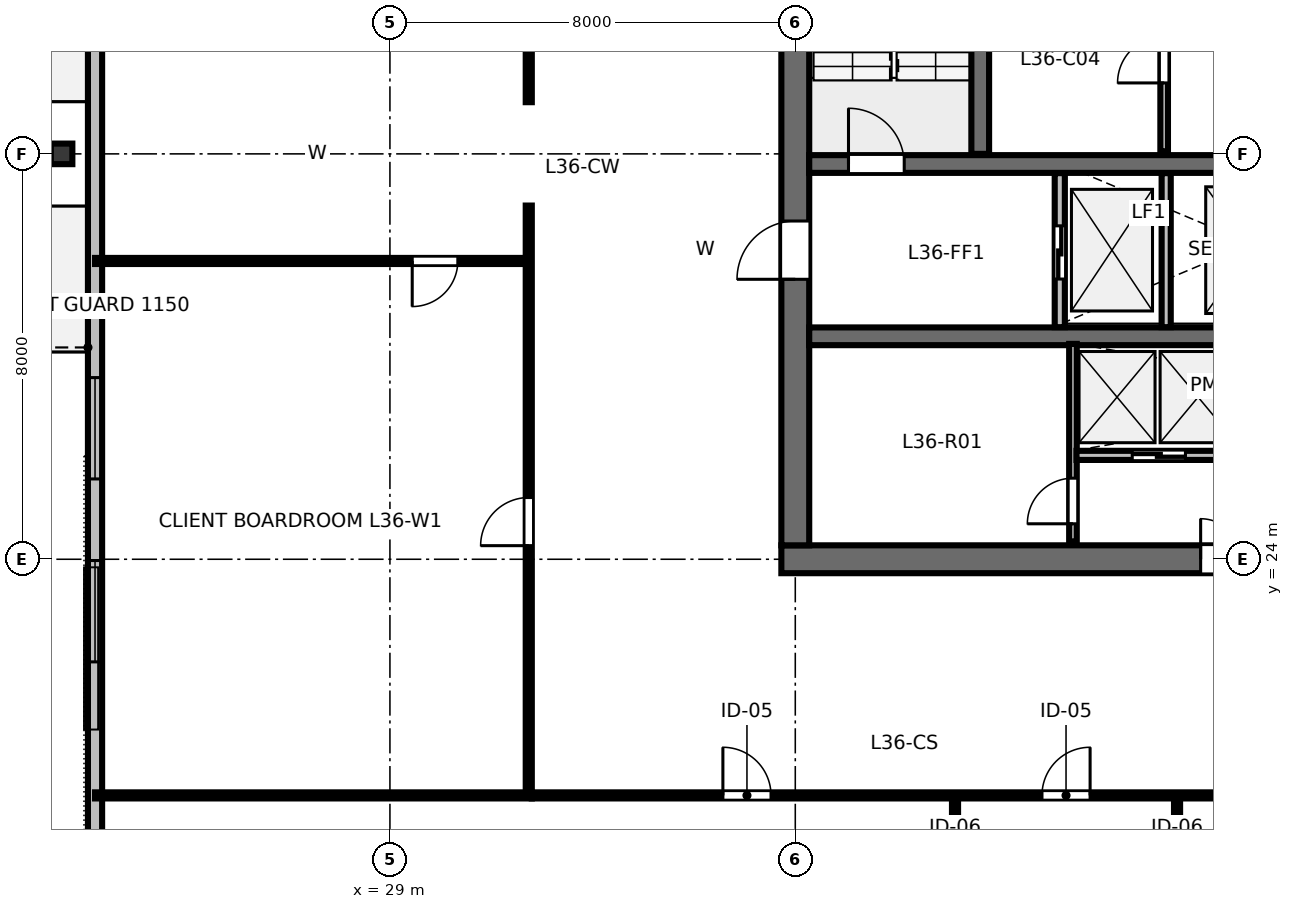
"""IFC4 building model, lengths in metres.
Left out: names, types, materials, properties, quantities, classifications, styles, units other than length and angle.
Written with IfcOpenShell. Run it as: python <this file> out.ifc"""

import sys

from ifc_helpers import new_model, si_unit, direction, frame, frame_2d, origin, origin_2d, place, context, subcontext, project, spatial, rectangle, i_section, extrude, element, fill, save


model = new_model("IFC4")
c1 = context("Model", 3, precision=1e-05, world=origin(), true_north=direction((0.0, 1.0)))
c2 = subcontext(c1, "Body", "Model", "MODEL_VIEW")
j1 = project(units=[si_unit("LENGTHUNIT", "METRE"), si_unit("PLANEANGLEUNIT", "RADIAN")], contexts=[c1])
p1 = place(None, origin())
s1 = spatial("IfcSite", under=j1, at=p1, CompositionType="ELEMENT")
p2 = place(p1, origin())
s2 = spatial("IfcBuilding", under=s1, at=p2, CompositionType="ELEMENT")
p3 = place(p2, frame((0.0, 0.0, 138.4)))
s3 = spatial("IfcBuildingStorey", under=s2, at=p3, CompositionType="ELEMENT", Elevation=138.4)
p4 = place(p3, frame((36.725, 24.0, 0.0), z_axis=(0.0, 0.0, 1.0), x_axis=(1.0, 0.0, 0.0)))
e1 = element("IfcWall", 1, at=p4, inside=s3, PredefinedType="SHEAR", context=c2, shape_type="SweptSolid", body=[
    extrude(rectangle(XDim=18.55, YDim=0.55, at=frame_2d((9.275, 0.0))), origin(), (0.0, 0.0, 1.0), 3.36),
])
p5 = place(p4, frame((8.275, 0.0, 0.0)))
e2 = element("IfcOpeningElement", 2, at=p5, cuts=e1, PredefinedType="OPENING", context=c2, shape_type="SweptSolid", body=[
    extrude(rectangle(XDim=1.6, YDim=2.15, at=frame_2d((0.8, 1.075))), frame((0.0, 0.285, 0.0), z_axis=(0.0, -1.0, 0.0), x_axis=(1.0, 0.0, 0.0)), (0.0, 0.0, 1.0), 0.57),
])
p6 = place(p4, frame((13.675, 0.0, 0.0)))
e3 = element("IfcOpeningElement", 3, at=p6, cuts=e1, PredefinedType="OPENING", context=c2, shape_type="SweptSolid", body=[
    extrude(rectangle(XDim=1.6, YDim=2.15, at=frame_2d((0.8, 1.075))), frame((0.0, 0.285, 0.0), z_axis=(0.0, -1.0, 0.0), x_axis=(1.0, 0.0, 0.0)), (0.0, 0.0, 1.0), 0.57),
])
p7 = place(p3, frame((37.0, 24.275, 0.0), z_axis=(0.0, 0.0, 1.0), x_axis=(0.0, 1.0, 0.0)))
e4 = element("IfcWall", 4, at=p7, inside=s3, PredefinedType="SHEAR", context=c2, shape_type="SweptSolid", body=[
    extrude(rectangle(XDim=15.45, YDim=0.55, at=frame_2d((7.725, 0.0))), origin(), (0.0, 0.0, 1.0), 3.36),
])
p8 = place(p7, frame((5.25, 0.0, 0.0)))
e5 = element("IfcOpeningElement", 5, at=p8, cuts=e4, PredefinedType="OPENING", context=c2, shape_type="SweptSolid", body=[
    extrude(rectangle(XDim=1.15, YDim=2.15, at=frame_2d((0.575, 1.075))), frame((0.0, 0.285, 0.0), z_axis=(0.0, -1.0, 0.0), x_axis=(1.0, 0.0, 0.0)), (0.0, 0.0, 1.0), 0.57),
])
p9 = place(p3, frame((37.275, 31.8, 0.0), z_axis=(0.0, 0.0, 1.0), x_axis=(1.0, 0.0, 0.0)))
e6 = element("IfcWall", 6, at=p9, inside=s3, PredefinedType="SHEAR", context=c2, shape_type="SweptSolid", body=[
    extrude(rectangle(XDim=17.45, YDim=0.35, at=frame_2d((8.725, 0.0))), origin(), (0.0, 0.0, 1.0), 3.36),
])
p10 = place(p9, frame((0.775, 0.0, 0.0)))
e7 = element("IfcOpeningElement", 7, at=p10, cuts=e6, PredefinedType="OPENING", context=c2, shape_type="SweptSolid", body=[
    extrude(rectangle(XDim=1.1, YDim=2.15, at=frame_2d((0.55, 1.075))), frame((0.0, 0.185, 0.0), z_axis=(0.0, -1.0, 0.0), x_axis=(1.0, 0.0, 0.0)), (0.0, 0.0, 1.0), 0.37),
])
p11 = place(p9, frame((14.675, 0.0, 0.0)))
e8 = element("IfcOpeningElement", 8, at=p11, cuts=e6, PredefinedType="OPENING", context=c2, shape_type="SweptSolid", body=[
    extrude(rectangle(XDim=1.1, YDim=2.15, at=frame_2d((0.55, 1.075))), frame((0.0, 0.185, 0.0), z_axis=(0.0, -1.0, 0.0), x_axis=(1.0, 0.0, 0.0)), (0.0, 0.0, 1.0), 0.37),
])
p12 = place(p3, frame((37.275, 28.4, 0.0), z_axis=(0.0, 0.0, 1.0), x_axis=(1.0, 0.0, 0.0)))
e9 = element("IfcWall", 9, at=p12, inside=s3, PredefinedType="SHEAR", context=c2, shape_type="SweptSolid", body=[
    extrude(rectangle(XDim=17.45, YDim=0.35, at=frame_2d((8.725, 0.0))), origin(), (0.0, 0.0, 1.0), 3.36),
])
p13 = place(p3, frame((22.52, 32.0, 0.0), z_axis=(0.0, 0.0, 1.0), x_axis=(0.0, 1.0, 0.0)))
e10 = element("IfcColumn", 10, at=p13, inside=s3, PredefinedType="COLUMN", context=c2, shape_type="SweptSolid", body=[
    extrude(i_section(OverallWidth=0.406, OverallDepth=0.425, WebThickness=0.033, FlangeThickness=0.052, FilletRadius=0.025, at=origin_2d()), origin(), (0.0, 0.0, 1.0), 3.358),
])
p14 = place(p3, frame((23.18, 47.54, 0.0), z_axis=(0.0, 0.0, 1.0), x_axis=(0.0, -1.0, 0.0)))
e11 = element("IfcWall", 11, at=p14, inside=s3, PredefinedType="STANDARD", context=c2, shape_type="SweptSolid", body=[
    extrude(rectangle(XDim=31.08, YDim=0.28, at=frame_2d((15.54, 0.0))), origin(), (0.0, 0.0, 1.0), 3.36),
])
p15 = place(p14, frame((11.86, 0.0, 0.0)))
e12 = element("IfcOpeningElement", 12, at=p15, cuts=e11, PredefinedType="OPENING", context=c2, shape_type="SweptSolid", body=[
    extrude(rectangle(XDim=1.4, YDim=2.15, at=frame_2d((0.7, 1.075))), frame((0.0, 0.15, 0.0), z_axis=(0.0, -1.0, 0.0), x_axis=(1.0, 0.0, 0.0)), (0.0, 0.0, 1.0), 0.3),
])
p16 = place(p14, frame((5.515, 0.0, 0.8)))
e13 = element("IfcOpeningElement", 13, at=p16, cuts=e11, PredefinedType="OPENING", context=c2, shape_type="SweptSolid", body=[
    extrude(rectangle(XDim=2.0, YDim=1.95, at=frame_2d((1.0, 0.975))), frame((0.0, 0.15, 0.0), z_axis=(0.0, -1.0, 0.0), x_axis=(1.0, 0.0, 0.0)), (0.0, 0.0, 1.0), 0.3),
])
p17 = place(p14, frame((9.125, 0.0, 0.8)))
e14 = element("IfcOpeningElement", 14, at=p17, cuts=e11, PredefinedType="OPENING", context=c2, shape_type="SweptSolid", body=[
    extrude(rectangle(XDim=2.0, YDim=1.95, at=frame_2d((1.0, 0.975))), frame((0.0, 0.15, 0.0), z_axis=(0.0, -1.0, 0.0), x_axis=(1.0, 0.0, 0.0)), (0.0, 0.0, 1.0), 0.3),
])
p18 = place(p14, frame((19.955, 0.0, 0.8)))
e15 = element("IfcOpeningElement", 15, at=p18, cuts=e11, PredefinedType="OPENING", context=c2, shape_type="SweptSolid", body=[
    extrude(rectangle(XDim=2.0, YDim=1.95, at=frame_2d((1.0, 0.975))), frame((0.0, 0.15, 0.0), z_axis=(0.0, -1.0, 0.0), x_axis=(1.0, 0.0, 0.0)), (0.0, 0.0, 1.0), 0.3),
])
p19 = place(p14, frame((23.565, 0.0, 0.8)))
e16 = element("IfcOpeningElement", 16, at=p19, cuts=e11, PredefinedType="OPENING", context=c2, shape_type="SweptSolid", body=[
    extrude(rectangle(XDim=2.0, YDim=1.95, at=frame_2d((1.0, 0.975))), frame((0.0, 0.15, 0.0), z_axis=(0.0, -1.0, 0.0), x_axis=(1.0, 0.0, 0.0)), (0.0, 0.0, 1.0), 0.3),
])
p20 = place(p3, frame((40.65, 32.0, 0.0), z_axis=(0.0, 0.0, 1.0), x_axis=(0.0, 1.0, 0.0)))
e17 = element("IfcWall", 17, at=p20, inside=s3, PredefinedType="SHEAR", context=c2, shape_type="SweptSolid", body=[
    extrude(rectangle(XDim=7.7, YDim=0.35, at=frame_2d((3.85, 0.0))), origin(), (0.0, 0.0, 1.0), 3.6),
])
p21 = place(p3, frame((44.28, 32.05, 0.0), z_axis=(0.0, 0.0, 1.0), x_axis=(0.0, 1.0, 0.0)))
e18 = element("IfcWall", 18, at=p21, inside=s3, PredefinedType="PARTITIONING", context=c2, shape_type="SweptSolid", body=[
    extrude(rectangle(XDim=3.67, YDim=0.15, at=frame_2d((1.835, 0.0))), origin(), (0.0, 0.0, 1.0), 3.36),
])
p22 = place(p21, frame((1.35, 0.0, 0.0)))
e19 = element("IfcOpeningElement", 19, at=p22, cuts=e18, PredefinedType="OPENING", context=c2, shape_type="SweptSolid", body=[
    extrude(rectangle(XDim=0.92, YDim=2.15, at=frame_2d((0.46, 1.075))), frame((0.0, 0.085, 0.0), z_axis=(0.0, -1.0, 0.0), x_axis=(1.0, 0.0, 0.0)), (0.0, 0.0, 1.0), 0.17),
])
p23 = place(p3, frame((42.22, 28.58, 0.0), z_axis=(0.0, 0.0, 1.0), x_axis=(0.0, 1.0, 0.0)))
e20 = element("IfcWall", 20, at=p23, inside=s3, PredefinedType="PARTITIONING", context=c2, shape_type="SweptSolid", body=[
    extrude(rectangle(XDim=3.04, YDim=0.2, at=frame_2d((1.52, 0.0))), origin(), (0.0, 0.0, 1.0), 3.36),
])
p24 = place(p23, frame((0.95, 0.0, 0.0)))
e21 = element("IfcOpeningElement", 21, at=p24, cuts=e20, PredefinedType="OPENING", context=c2, shape_type="SweptSolid", body=[
    extrude(rectangle(XDim=1.05, YDim=2.15, at=frame_2d((0.525, 1.075))), frame((0.0, 0.11, 0.0), z_axis=(0.0, -1.0, 0.0), x_axis=(1.0, 0.0, 0.0)), (0.0, 0.0, 1.0), 0.22),
])
p25 = place(p3, frame((44.32, 28.58, 0.0), z_axis=(0.0, 0.0, 1.0), x_axis=(0.0, 1.0, 0.0)))
e22 = element("IfcWall", 22, at=p25, inside=s3, PredefinedType="PARTITIONING", context=c2, shape_type="SweptSolid", body=[
    extrude(rectangle(XDim=3.04, YDim=0.18, at=frame_2d((1.52, 0.0))), origin(), (0.0, 0.0, 1.0), 3.36),
])
p26 = place(p3, frame((42.48, 24.35, 0.0), z_axis=(0.0, 0.0, 1.0), x_axis=(0.0, 1.0, 0.0)))
e23 = element("IfcWall", 23, at=p26, inside=s3, PredefinedType="PARTITIONING", context=c2, shape_type="SweptSolid", body=[
    extrude(rectangle(XDim=3.9, YDim=0.15, at=frame_2d((1.95, 0.0))), origin(), (0.0, 0.0, 1.0), 3.36),
])
p27 = place(p26, frame((0.35, 0.0, 0.0)))
e24 = element("IfcOpeningElement", 24, at=p27, cuts=e23, PredefinedType="OPENING", context=c2, shape_type="SweptSolid", body=[
    extrude(rectangle(XDim=0.9, YDim=2.15, at=frame_2d((0.45, 1.075))), frame((0.0, 0.085, 0.0), z_axis=(0.0, -1.0, 0.0), x_axis=(1.0, 0.0, 0.0)), (0.0, 0.0, 1.0), 0.17),
])
p28 = place(p3, frame((42.55, 26.05, 0.0), z_axis=(0.0, 0.0, 1.0), x_axis=(1.0, 0.0, 0.0)))
e25 = element("IfcWall", 25, at=p28, inside=s3, PredefinedType="PARTITIONING", context=c2, shape_type="SweptSolid", body=[
    extrude(rectangle(XDim=12.05, YDim=0.18, at=frame_2d((6.025, 0.0))), origin(), (0.0, 0.0, 1.0), 3.36),
])
p29 = place(p28, frame((1.1, 0.0, 0.0)))
e26 = element("IfcOpeningElement", 26, at=p29, cuts=e25, PredefinedType="OPENING", context=c2, shape_type="SweptSolid", body=[
    extrude(rectangle(XDim=1.05, YDim=2.15, at=frame_2d((0.525, 1.075))), frame((0.0, 0.1, 0.0), z_axis=(0.0, -1.0, 0.0), x_axis=(1.0, 0.0, 0.0)), (0.0, 0.0, 1.0), 0.2),
])
p30 = place(p28, frame((3.0, 0.0, 0.0)))
e27 = element("IfcOpeningElement", 27, at=p30, cuts=e25, PredefinedType="OPENING", context=c2, shape_type="SweptSolid", body=[
    extrude(rectangle(XDim=1.05, YDim=2.15, at=frame_2d((0.525, 1.075))), frame((0.0, 0.1, 0.0), z_axis=(0.0, -1.0, 0.0), x_axis=(1.0, 0.0, 0.0)), (0.0, 0.0, 1.0), 0.2),
])
p31 = place(p3, frame((40.152, 19.34, 0.0), z_axis=(0.0, 0.0, 1.0), x_axis=(0.0, -1.0, 0.0)))
e28 = element("IfcWall", 28, at=p31, inside=s3, PredefinedType="PARTITIONING", context=c2, shape_type="SweptSolid", body=[
    extrude(rectangle(XDim=7.46, YDim=0.12, at=frame_2d((3.73, 0.0))), origin(), (0.0, 0.0, 1.0), 2.64),
])
p32 = place(p31, frame((1.4, 0.0, 0.0)))
e29 = element("IfcOpeningElement", 29, at=p32, cuts=e28, PredefinedType="OPENING", context=c2, shape_type="SweptSolid", body=[
    extrude(rectangle(XDim=0.9, YDim=2.15, at=frame_2d((0.45, 1.075))), frame((0.0, 0.07, 0.0), z_axis=(0.0, -1.0, 0.0), x_axis=(1.0, 0.0, 0.0)), (0.0, 0.0, 1.0), 0.14),
])
p33 = place(p3, frame((44.534, 19.34, 0.0), z_axis=(0.0, 0.0, 1.0), x_axis=(0.0, -1.0, 0.0)))
e30 = element("IfcWall", 30, at=p33, inside=s3, PredefinedType="PARTITIONING", context=c2, shape_type="SweptSolid", body=[
    extrude(rectangle(XDim=7.46, YDim=0.12, at=frame_2d((3.73, 0.0))), origin(), (0.0, 0.0, 1.0), 2.64),
])
p34 = place(p33, frame((1.4, 0.0, 0.0)))
e31 = element("IfcOpeningElement", 31, at=p34, cuts=e30, PredefinedType="OPENING", context=c2, shape_type="SweptSolid", body=[
    extrude(rectangle(XDim=0.9, YDim=2.15, at=frame_2d((0.45, 1.075))), frame((0.0, 0.07, 0.0), z_axis=(0.0, -1.0, 0.0), x_axis=(1.0, 0.0, 0.0)), (0.0, 0.0, 1.0), 0.14),
])
p35 = place(p3, frame((31.8, 19.34, 0.0), z_axis=(0.0, 0.0, 1.0), x_axis=(1.0, 0.0, 0.0)))
e32 = element("IfcWall", 32, at=p35, inside=s3, PredefinedType="PARTITIONING", context=c2, shape_type="SweptSolid", body=[
    extrude(rectangle(XDim=28.4, YDim=0.12, at=frame_2d((14.2, 0.0))), origin(), (0.0, 0.0, 1.0), 2.64),
])
p36 = place(p35, frame((3.771, 0.0, 0.0)))
e33 = element("IfcOpeningElement", 33, at=p36, cuts=e32, PredefinedType="OPENING", context=c2, shape_type="SweptSolid", body=[
    extrude(rectangle(XDim=0.95, YDim=2.15, at=frame_2d((0.475, 1.075))), frame((0.0, 0.07, 0.0), z_axis=(0.0, -1.0, 0.0), x_axis=(1.0, 0.0, 0.0)), (0.0, 0.0, 1.0), 0.14),
])
p37 = place(p35, frame((10.068, 0.0, 0.0)))
e34 = element("IfcOpeningElement", 34, at=p37, cuts=e32, PredefinedType="OPENING", context=c2, shape_type="SweptSolid", body=[
    extrude(rectangle(XDim=0.95, YDim=2.15, at=frame_2d((0.475, 1.075))), frame((0.0, 0.07, 0.0), z_axis=(0.0, -1.0, 0.0), x_axis=(1.0, 0.0, 0.0)), (0.0, 0.0, 1.0), 0.14),
])
p38 = place(p35, frame((13.828, 0.0, 0.0)))
e35 = element("IfcOpeningElement", 35, at=p38, cuts=e32, PredefinedType="OPENING", context=c2, shape_type="SweptSolid", body=[
    extrude(rectangle(XDim=0.95, YDim=2.15, at=frame_2d((0.475, 1.075))), frame((0.0, 0.07, 0.0), z_axis=(0.0, -1.0, 0.0), x_axis=(1.0, 0.0, 0.0)), (0.0, 0.0, 1.0), 0.14),
])
p39 = place(p35, frame((18.648, 0.0, 0.0)))
e36 = element("IfcOpeningElement", 36, at=p39, cuts=e32, PredefinedType="OPENING", context=c2, shape_type="SweptSolid", body=[
    extrude(rectangle(XDim=0.95, YDim=2.15, at=frame_2d((0.475, 1.075))), frame((0.0, 0.07, 0.0), z_axis=(0.0, -1.0, 0.0), x_axis=(1.0, 0.0, 0.0)), (0.0, 0.0, 1.0), 0.14),
])
p40 = place(p35, frame((24.842, 0.0, 0.0)))
e37 = element("IfcOpeningElement", 37, at=p40, cuts=e32, PredefinedType="OPENING", context=c2, shape_type="SweptSolid", body=[
    extrude(rectangle(XDim=0.95, YDim=2.15, at=frame_2d((0.475, 1.075))), frame((0.0, 0.07, 0.0), z_axis=(0.0, -1.0, 0.0), x_axis=(1.0, 0.0, 0.0)), (0.0, 0.0, 1.0), 0.14),
])
p41 = place(p3, frame((31.74, 29.887, 0.0), z_axis=(0.0, 0.0, 1.0), x_axis=(-1.0, 0.0, 0.0)))
e38 = element("IfcWall", 38, at=p41, inside=s3, PredefinedType="PARTITIONING", context=c2, shape_type="SweptSolid", body=[
    extrude(rectangle(XDim=8.56, YDim=0.12, at=frame_2d((4.28, 0.0))), origin(), (0.0, 0.0, 1.0), 2.64),
])
p42 = place(p41, frame((1.4, 0.0, 0.0)))
e39 = element("IfcOpeningElement", 39, at=p42, cuts=e38, PredefinedType="OPENING", context=c2, shape_type="SweptSolid", body=[
    extrude(rectangle(XDim=0.9, YDim=2.15, at=frame_2d((0.45, 1.075))), frame((0.0, 0.07, 0.0), z_axis=(0.0, -1.0, 0.0), x_axis=(1.0, 0.0, 0.0)), (0.0, 0.0, 1.0), 0.14),
])
p43 = place(p3, frame((31.74, 19.4, 0.0), z_axis=(0.0, 0.0, 1.0), x_axis=(0.0, 1.0, 0.0)))
e40 = element("IfcWall", 40, at=p43, inside=s3, PredefinedType="PARTITIONING", context=c2, shape_type="SweptSolid", body=[
    extrude(rectangle(XDim=11.58, YDim=0.12, at=frame_2d((5.79, 0.0))), origin(), (0.0, 0.0, 1.0), 2.64),
])
p44 = place(p43, frame((4.868, 0.0, 0.0)))
e41 = element("IfcOpeningElement", 41, at=p44, cuts=e40, PredefinedType="OPENING", context=c2, shape_type="SweptSolid", body=[
    extrude(rectangle(XDim=0.95, YDim=2.15, at=frame_2d((0.475, 1.075))), frame((0.0, 0.07, 0.0), z_axis=(0.0, -1.0, 0.0), x_axis=(1.0, 0.0, 0.0)), (0.0, 0.0, 1.0), 0.14),
])
p45 = place(p3, frame((31.74, 33.02, 0.0), z_axis=(0.0, 0.0, 1.0), x_axis=(0.0, 1.0, 0.0)))
e42 = element("IfcWall", 42, at=p45, inside=s3, PredefinedType="PARTITIONING", context=c2, shape_type="SweptSolid", body=[
    extrude(rectangle(XDim=11.58, YDim=0.12, at=frame_2d((5.79, 0.0))), origin(), (0.0, 0.0, 1.0), 2.64),
])
p46 = place(p45, frame((5.215, 0.0, 0.0)))
e43 = element("IfcOpeningElement", 43, at=p46, cuts=e42, PredefinedType="OPENING", context=c2, shape_type="SweptSolid", body=[
    extrude(rectangle(XDim=0.95, YDim=2.15, at=frame_2d((0.475, 1.075))), frame((0.0, 0.07, 0.0), z_axis=(0.0, -1.0, 0.0), x_axis=(1.0, 0.0, 0.0)), (0.0, 0.0, 1.0), 0.14),
])
p47 = place(p3, frame((31.8, 19.34, 0.0), z_axis=(0.0, 0.0, 1.0), x_axis=(-1.0, 0.0, 0.0)))
e44 = element("IfcWall", 44, at=p47, inside=s3, PredefinedType="PARTITIONING", context=c2, shape_type="SweptSolid", body=[
    extrude(rectangle(XDim=8.62, YDim=0.12, at=frame_2d((4.31, 0.0))), origin(), (0.0, 0.0, 1.0), 2.64),
])
p48 = place(p18, origin())
e45 = element("IfcWindow", 45, at=p48, inside=s3, PartitioningType="SINGLE_PANEL", PredefinedType="WINDOW", context=c2, shape_type="SweptSolid", body=[
    extrude(rectangle(XDim=2.0, YDim=1.95, at=frame_2d((1.0, 0.975))), frame((0.0, 0.03, 0.0), z_axis=(0.0, -1.0, 0.0), x_axis=(1.0, 0.0, 0.0)), (0.0, 0.0, 1.0), 0.06),
])
fill(e15, e45)
p49 = place(p19, origin())
e46 = element("IfcWindow", 46, at=p49, inside=s3, PartitioningType="SINGLE_PANEL", PredefinedType="WINDOW", context=c2, shape_type="SweptSolid", body=[
    extrude(rectangle(XDim=2.0, YDim=1.95, at=frame_2d((1.0, 0.975))), frame((0.0, 0.03, 0.0), z_axis=(0.0, -1.0, 0.0), x_axis=(1.0, 0.0, 0.0)), (0.0, 0.0, 1.0), 0.06),
])
fill(e16, e46)
p50 = place(p10, origin())
e47 = element("IfcDoor", 47, at=p50, inside=s3, OperationType="SINGLE_SWING_LEFT", PredefinedType="DOOR", context=c2, shape_type="SweptSolid", body=[
    extrude(rectangle(XDim=1.1, YDim=2.15, at=frame_2d((0.55, 1.075))), frame((0.0, 0.025, 0.0), z_axis=(0.0, -1.0, 0.0), x_axis=(1.0, 0.0, 0.0)), (0.0, 0.0, 1.0), 0.05),
])
fill(e7, e47)
p51 = place(p8, origin())
e48 = element("IfcDoor", 48, at=p51, inside=s3, OperationType="SINGLE_SWING_LEFT", PredefinedType="DOOR", context=c2, shape_type="SweptSolid", body=[
    extrude(rectangle(XDim=1.15, YDim=2.15, at=frame_2d((0.575, 1.075))), frame((0.0, 0.025, 0.0), z_axis=(0.0, -1.0, 0.0), x_axis=(1.0, 0.0, 0.0)), (0.0, 0.0, 1.0), 0.05),
])
fill(e5, e48)
p52 = place(p5, origin())
e49 = element("IfcDoor", 49, at=p52, inside=s3, OperationType="DOUBLE_DOOR_SINGLE_SWING", PredefinedType="DOOR", context=c2, shape_type="SweptSolid", body=[
    extrude(rectangle(XDim=1.6, YDim=2.15, at=frame_2d((0.8, 1.075))), frame((0.0, 0.025, 0.0), z_axis=(0.0, -1.0, 0.0), x_axis=(1.0, 0.0, 0.0)), (0.0, 0.0, 1.0), 0.05),
])
fill(e2, e49)
p53 = place(p22, origin())
e50 = element("IfcDoor", 50, at=p53, inside=s3, OperationType="SINGLE_SWING_LEFT", PredefinedType="DOOR", context=c2, shape_type="SweptSolid", body=[
    extrude(rectangle(XDim=0.92, YDim=2.15, at=frame_2d((0.46, 1.075))), frame((0.0, 0.025, 0.0), z_axis=(0.0, -1.0, 0.0), x_axis=(1.0, 0.0, 0.0)), (0.0, 0.0, 1.0), 0.05),
])
fill(e19, e50)
p54 = place(p24, origin())
e51 = element("IfcDoor", 51, at=p54, inside=s3, OperationType="SLIDING_TO_LEFT", PredefinedType="DOOR", context=c2, shape_type="SweptSolid", body=[
    extrude(rectangle(XDim=1.05, YDim=2.15, at=frame_2d((0.525, 1.075))), frame((0.0, 0.025, 0.0), z_axis=(0.0, -1.0, 0.0), x_axis=(1.0, 0.0, 0.0)), (0.0, 0.0, 1.0), 0.05),
])
fill(e21, e51)
p55 = place(p27, origin())
e52 = element("IfcDoor", 52, at=p55, inside=s3, OperationType="SINGLE_SWING_LEFT", PredefinedType="DOOR", context=c2, shape_type="SweptSolid", body=[
    extrude(rectangle(XDim=0.9, YDim=2.15, at=frame_2d((0.45, 1.075))), frame((0.0, 0.025, 0.0), z_axis=(0.0, -1.0, 0.0), x_axis=(1.0, 0.0, 0.0)), (0.0, 0.0, 1.0), 0.05),
])
fill(e24, e52)
p56 = place(p29, origin())
e53 = element("IfcDoor", 53, at=p56, inside=s3, OperationType="SLIDING_TO_LEFT", PredefinedType="DOOR", context=c2, shape_type="SweptSolid", body=[
    extrude(rectangle(XDim=1.05, YDim=2.15, at=frame_2d((0.525, 1.075))), frame((0.0, 0.025, 0.0), z_axis=(0.0, -1.0, 0.0), x_axis=(1.0, 0.0, 0.0)), (0.0, 0.0, 1.0), 0.05),
])
fill(e26, e53)
p57 = place(p36, origin())
e54 = element("IfcDoor", 54, at=p57, inside=s3, OperationType="SINGLE_SWING_LEFT", PredefinedType="DOOR", context=c2, shape_type="SweptSolid", body=[
    extrude(rectangle(XDim=0.95, YDim=2.15, at=frame_2d((0.475, 1.075))), frame((0.0, 0.025, 0.0), z_axis=(0.0, -1.0, 0.0), x_axis=(1.0, 0.0, 0.0)), (0.0, 0.0, 1.0), 0.05),
])
fill(e33, e54)
p58 = place(p37, origin())
e55 = element("IfcDoor", 55, at=p58, inside=s3, OperationType="SINGLE_SWING_RIGHT", PredefinedType="DOOR", context=c2, shape_type="SweptSolid", body=[
    extrude(rectangle(XDim=0.95, YDim=2.15, at=frame_2d((0.475, 1.075))), frame((0.0, 0.025, 0.0), z_axis=(0.0, -1.0, 0.0), x_axis=(1.0, 0.0, 0.0)), (0.0, 0.0, 1.0), 0.05),
])
fill(e34, e55)
p59 = place(p42, origin())
e56 = element("IfcDoor", 56, at=p59, inside=s3, OperationType="SINGLE_SWING_RIGHT", PredefinedType="DOOR", context=c2, shape_type="SweptSolid", body=[
    extrude(rectangle(XDim=0.9, YDim=2.15, at=frame_2d((0.45, 1.075))), frame((0.0, 0.025, 0.0), z_axis=(0.0, -1.0, 0.0), x_axis=(1.0, 0.0, 0.0)), (0.0, 0.0, 1.0), 0.05),
])
fill(e39, e56)
p60 = place(p44, origin())
e57 = element("IfcDoor", 57, at=p60, inside=s3, OperationType="SINGLE_SWING_LEFT", PredefinedType="DOOR", context=c2, shape_type="SweptSolid", body=[
    extrude(rectangle(XDim=0.95, YDim=2.15, at=frame_2d((0.475, 1.075))), frame((0.0, 0.025, 0.0), z_axis=(0.0, -1.0, 0.0), x_axis=(1.0, 0.0, 0.0)), (0.0, 0.0, 1.0), 0.05),
])
fill(e41, e57)
save(model, sys.argv[1])
